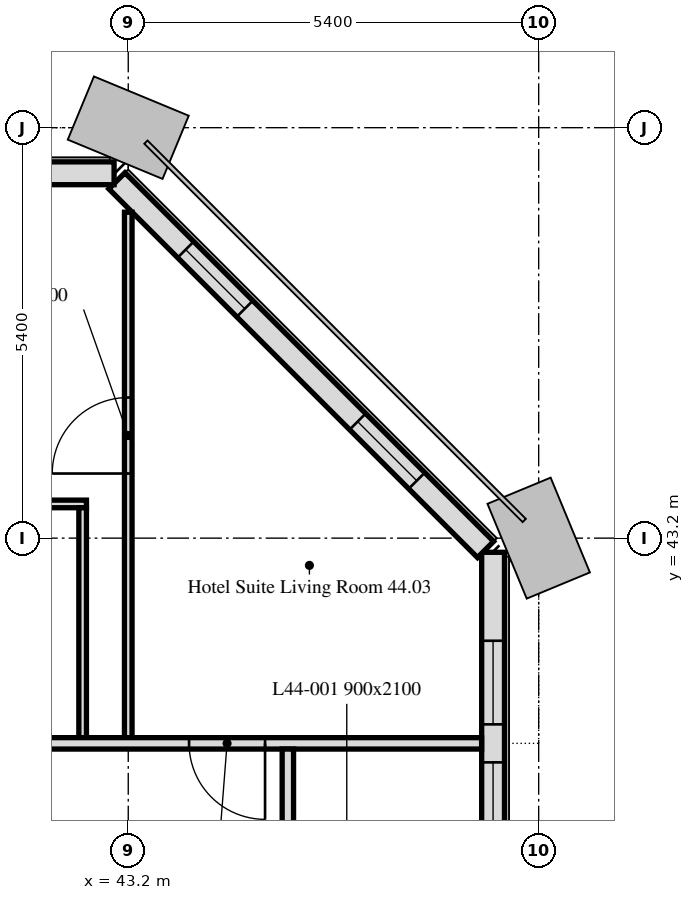
"""IFC4 building model, lengths in metres.
Left out: names, types, materials, properties, quantities, classifications, styles, units other than length and angle.
Written with IfcOpenShell. Run it as: python <this file> out.ifc"""

import sys

from ifc_helpers import new_model, si_unit, direction, frame, frame_2d, origin, place, context, subcontext, project, spatial, rectangle, extrude, element, fill, save


model = new_model("IFC4")
c1 = context("Model", 3, precision=1e-05, world=origin(), true_north=direction((0.0, 1.0)))
c2 = subcontext(c1, "Body", "Model", "MODEL_VIEW")
j1 = project(units=[si_unit("LENGTHUNIT", "METRE"), si_unit("PLANEANGLEUNIT", "RADIAN")], contexts=[c1])
p1 = place(None, origin())
s1 = spatial("IfcSite", under=j1, at=p1, CompositionType="ELEMENT")
p2 = place(p1, origin())
s2 = spatial("IfcBuilding", under=s1, at=p2, CompositionType="ELEMENT")
p3 = place(p2, frame((0.0, 0.0, 184.0)))
s3 = spatial("IfcBuildingStorey", under=s2, at=p3, CompositionType="ELEMENT", Elevation=184.0)
p4 = place(p3, frame((48.0, 10.986, 0.0), z_axis=(0.0, 0.0, 1.0), x_axis=(0.0, 1.0, 0.0)))
e1 = element("IfcWall", 1, at=p4, inside=s3, PredefinedType="SOLIDWALL", context=c2, shape_type="SweptSolid", body=[
    extrude(rectangle(XDim=32.027, YDim=0.3, at=frame_2d((16.014, 0.0))), origin(), (0.0, 0.0, 1.0), 3.0),
])
p5 = place(p4, frame((1.164, 0.0, 0.9)))
e2 = element("IfcOpeningElement", 2, at=p5, cuts=e1, PredefinedType="OPENING", context=c2, shape_type="SweptSolid", body=[
    extrude(rectangle(XDim=1.1, YDim=1.7, at=frame_2d((0.55, 0.85))), frame((0.0, 0.16, 0.0), z_axis=(0.0, -1.0, 0.0), x_axis=(1.0, 0.0, 0.0)), (0.0, 0.0, 1.0), 0.32),
])
p6 = place(p4, frame((2.764, 0.0, 0.9)))
e3 = element("IfcOpeningElement", 3, at=p6, cuts=e1, PredefinedType="OPENING", context=c2, shape_type="SweptSolid", body=[
    extrude(rectangle(XDim=1.1, YDim=1.7, at=frame_2d((0.55, 0.85))), frame((0.0, 0.16, 0.0), z_axis=(0.0, -1.0, 0.0), x_axis=(1.0, 0.0, 0.0)), (0.0, 0.0, 1.0), 0.32),
])
p7 = place(p4, frame((6.214, 0.0, 0.9)))
e4 = element("IfcOpeningElement", 4, at=p7, cuts=e1, PredefinedType="OPENING", context=c2, shape_type="SweptSolid", body=[
    extrude(rectangle(XDim=3.4, YDim=1.7, at=frame_2d((1.7, 0.85))), frame((0.0, 0.16, 0.0), z_axis=(0.0, -1.0, 0.0), x_axis=(1.0, 0.0, 0.0)), (0.0, 0.0, 1.0), 0.32),
])
p8 = place(p4, frame((11.964, 0.0, 0.9)))
e5 = element("IfcOpeningElement", 5, at=p8, cuts=e1, PredefinedType="OPENING", context=c2, shape_type="SweptSolid", body=[
    extrude(rectangle(XDim=1.1, YDim=1.7, at=frame_2d((0.55, 0.85))), frame((0.0, 0.16, 0.0), z_axis=(0.0, -1.0, 0.0), x_axis=(1.0, 0.0, 0.0)), (0.0, 0.0, 1.0), 0.32),
])
p9 = place(p4, frame((13.564, 0.0, 0.9)))
e6 = element("IfcOpeningElement", 6, at=p9, cuts=e1, PredefinedType="OPENING", context=c2, shape_type="SweptSolid", body=[
    extrude(rectangle(XDim=1.1, YDim=1.7, at=frame_2d((0.55, 0.85))), frame((0.0, 0.16, 0.0), z_axis=(0.0, -1.0, 0.0), x_axis=(1.0, 0.0, 0.0)), (0.0, 0.0, 1.0), 0.32),
])
p10 = place(p4, frame((17.014, 0.0, 0.9)))
e7 = element("IfcOpeningElement", 7, at=p10, cuts=e1, PredefinedType="OPENING", context=c2, shape_type="SweptSolid", body=[
    extrude(rectangle(XDim=3.4, YDim=1.7, at=frame_2d((1.7, 0.85))), frame((0.0, 0.16, 0.0), z_axis=(0.0, -1.0, 0.0), x_axis=(1.0, 0.0, 0.0)), (0.0, 0.0, 1.0), 0.32),
])
p11 = place(p4, frame((22.764, 0.0, 0.9)))
e8 = element("IfcOpeningElement", 8, at=p11, cuts=e1, PredefinedType="OPENING", context=c2, shape_type="SweptSolid", body=[
    extrude(rectangle(XDim=1.1, YDim=1.7, at=frame_2d((0.55, 0.85))), frame((0.0, 0.16, 0.0), z_axis=(0.0, -1.0, 0.0), x_axis=(1.0, 0.0, 0.0)), (0.0, 0.0, 1.0), 0.32),
])
p12 = place(p4, frame((24.364, 0.0, 0.9)))
e9 = element("IfcOpeningElement", 9, at=p12, cuts=e1, PredefinedType="OPENING", context=c2, shape_type="SweptSolid", body=[
    extrude(rectangle(XDim=1.1, YDim=1.7, at=frame_2d((0.55, 0.85))), frame((0.0, 0.16, 0.0), z_axis=(0.0, -1.0, 0.0), x_axis=(1.0, 0.0, 0.0)), (0.0, 0.0, 1.0), 0.32),
])
p13 = place(p4, frame((28.164, 0.0, 0.9)))
e10 = element("IfcOpeningElement", 10, at=p13, cuts=e1, PredefinedType="OPENING", context=c2, shape_type="SweptSolid", body=[
    extrude(rectangle(XDim=1.1, YDim=1.7, at=frame_2d((0.55, 0.85))), frame((0.0, 0.16, 0.0), z_axis=(0.0, -1.0, 0.0), x_axis=(1.0, 0.0, 0.0)), (0.0, 0.0, 1.0), 0.32),
])
p14 = place(p4, frame((29.764, 0.0, 0.9)))
e11 = element("IfcOpeningElement", 11, at=p14, cuts=e1, PredefinedType="OPENING", context=c2, shape_type="SweptSolid", body=[
    extrude(rectangle(XDim=1.1, YDim=1.7, at=frame_2d((0.55, 0.85))), frame((0.0, 0.16, 0.0), z_axis=(0.0, -1.0, 0.0), x_axis=(1.0, 0.0, 0.0)), (0.0, 0.0, 1.0), 0.32),
])
p15 = place(p3, frame((47.901, 43.051, 0.0), z_axis=(0.0, 0.0, 1.0), x_axis=(-0.707106781187, 0.707106781187, 0.0)))
e12 = element("IfcWall", 12, at=p15, inside=s3, PredefinedType="SOLIDWALL", context=c2, shape_type="SweptSolid", body=[
    extrude(rectangle(XDim=6.86, YDim=0.3, at=frame_2d((3.43, 0.0))), origin(), (0.0, 0.0, 1.0), 3.0),
])
p16 = place(p15, frame((1.28, 0.0, 0.9)))
e13 = element("IfcOpeningElement", 13, at=p16, cuts=e12, PredefinedType="OPENING", context=c2, shape_type="SweptSolid", body=[
    extrude(rectangle(XDim=1.1, YDim=1.7, at=frame_2d((0.55, 0.85))), frame((0.0, 0.16, 0.0), z_axis=(0.0, -1.0, 0.0), x_axis=(1.0, 0.0, 0.0)), (0.0, 0.0, 1.0), 0.32),
])
p17 = place(p15, frame((4.48, 0.0, 0.9)))
e14 = element("IfcOpeningElement", 14, at=p17, cuts=e12, PredefinedType="OPENING", context=c2, shape_type="SweptSolid", body=[
    extrude(rectangle(XDim=1.1, YDim=1.7, at=frame_2d((0.55, 0.85))), frame((0.0, 0.16, 0.0), z_axis=(0.0, -1.0, 0.0), x_axis=(1.0, 0.0, 0.0)), (0.0, 0.0, 1.0), 0.32),
])
p18 = place(p3, frame((43.014, 48.0, 0.0), z_axis=(0.0, 0.0, 1.0), x_axis=(-1.0, 0.0, 0.0)))
e15 = element("IfcWall", 15, at=p18, inside=s3, PredefinedType="SOLIDWALL", context=c2, shape_type="SweptSolid", body=[
    extrude(rectangle(XDim=32.027, YDim=0.3, at=frame_2d((16.014, 0.0))), origin(), (0.0, 0.0, 1.0), 3.0),
])
p19 = place(p18, frame((2.764, 0.0, 0.9)))
e16 = element("IfcOpeningElement", 16, at=p19, cuts=e15, PredefinedType="OPENING", context=c2, shape_type="SweptSolid", body=[
    extrude(rectangle(XDim=1.1, YDim=1.7, at=frame_2d((0.55, 0.85))), frame((0.0, 0.16, 0.0), z_axis=(0.0, -1.0, 0.0), x_axis=(1.0, 0.0, 0.0)), (0.0, 0.0, 1.0), 0.32),
])
p20 = place(p18, frame((6.214, 0.0, 0.9)))
e17 = element("IfcOpeningElement", 17, at=p20, cuts=e15, PredefinedType="OPENING", context=c2, shape_type="SweptSolid", body=[
    extrude(rectangle(XDim=3.4, YDim=1.7, at=frame_2d((1.7, 0.85))), frame((0.0, 0.16, 0.0), z_axis=(0.0, -1.0, 0.0), x_axis=(1.0, 0.0, 0.0)), (0.0, 0.0, 1.0), 0.32),
])
p21 = place(p18, frame((13.564, 0.0, 0.9)))
e18 = element("IfcOpeningElement", 18, at=p21, cuts=e15, PredefinedType="OPENING", context=c2, shape_type="SweptSolid", body=[
    extrude(rectangle(XDim=1.1, YDim=1.7, at=frame_2d((0.55, 0.85))), frame((0.0, 0.16, 0.0), z_axis=(0.0, -1.0, 0.0), x_axis=(1.0, 0.0, 0.0)), (0.0, 0.0, 1.0), 0.32),
])
p22 = place(p18, frame((17.014, 0.0, 0.9)))
e19 = element("IfcOpeningElement", 19, at=p22, cuts=e15, PredefinedType="OPENING", context=c2, shape_type="SweptSolid", body=[
    extrude(rectangle(XDim=3.4, YDim=1.7, at=frame_2d((1.7, 0.85))), frame((0.0, 0.16, 0.0), z_axis=(0.0, -1.0, 0.0), x_axis=(1.0, 0.0, 0.0)), (0.0, 0.0, 1.0), 0.32),
])
p23 = place(p18, frame((24.364, 0.0, 0.9)))
e20 = element("IfcOpeningElement", 20, at=p23, cuts=e15, PredefinedType="OPENING", context=c2, shape_type="SweptSolid", body=[
    extrude(rectangle(XDim=1.1, YDim=1.7, at=frame_2d((0.55, 0.85))), frame((0.0, 0.16, 0.0), z_axis=(0.0, -1.0, 0.0), x_axis=(1.0, 0.0, 0.0)), (0.0, 0.0, 1.0), 0.32),
])
p24 = place(p18, frame((27.814, 0.0, 0.9)))
e21 = element("IfcOpeningElement", 21, at=p24, cuts=e15, PredefinedType="OPENING", context=c2, shape_type="SweptSolid", body=[
    extrude(rectangle(XDim=3.4, YDim=1.7, at=frame_2d((1.7, 0.85))), frame((0.0, 0.16, 0.0), z_axis=(0.0, -1.0, 0.0), x_axis=(1.0, 0.0, 0.0)), (0.0, 0.0, 1.0), 0.32),
])
p25 = place(p3, frame((40.25, 43.65, 0.0), z_axis=(0.0, 0.0, 1.0), x_axis=(1.0, 0.0, 0.0)))
e22 = element("IfcWall", 22, at=p25, inside=s3, PredefinedType="PARTITIONING", context=c2, shape_type="SweptSolid", body=[
    extrude(rectangle(XDim=2.4, YDim=0.1, at=frame_2d((1.2, 0.0))), origin(), (0.0, 0.0, 1.0), 3.0),
])
p26 = place(p25, frame((0.9, 0.0, 0.0)))
e23 = element("IfcOpeningElement", 23, at=p26, cuts=e22, PredefinedType="OPENING", context=c2, shape_type="SweptSolid", body=[
    extrude(rectangle(XDim=0.9, YDim=2.1, at=frame_2d((0.45, 1.05))), frame((0.0, 0.05, 0.0), z_axis=(0.0, -1.0, 0.0), x_axis=(1.0, 0.0, 0.0)), (0.0, 0.0, 1.0), 0.1),
])
p27 = place(p3, frame((42.6, 43.6, 0.0), z_axis=(0.0, 0.0, 1.0), x_axis=(0.0, -1.0, 0.0)))
e24 = element("IfcWall", 24, at=p27, inside=s3, PredefinedType="PARTITIONING", context=c2, shape_type="SweptSolid", body=[
    extrude(rectangle(XDim=3.025, YDim=0.1, at=frame_2d((1.513, 0.0))), origin(), (0.0, 0.0, 1.0), 3.0),
])
p28 = place(p3, frame((43.2, 40.575, 0.0), z_axis=(0.0, 0.0, 1.0), x_axis=(0.0, 1.0, 0.0)))
e25 = element("IfcWall", 25, at=p28, inside=s3, PredefinedType="PARTITIONING", context=c2, shape_type="SweptSolid", body=[
    extrude(rectangle(XDim=6.913, YDim=0.1, at=frame_2d((3.457, 0.0))), origin(), (0.0, 0.0, 1.0), 3.0),
])
p29 = place(p28, frame((3.475, 0.0, 0.0)))
e26 = element("IfcOpeningElement", 26, at=p29, cuts=e25, PredefinedType="OPENING", context=c2, shape_type="SweptSolid", body=[
    extrude(rectangle(XDim=1.0, YDim=2.1, at=frame_2d((0.5, 1.05))), frame((0.0, 0.05, 0.0), z_axis=(0.0, -1.0, 0.0), x_axis=(1.0, 0.0, 0.0)), (0.0, 0.0, 1.0), 0.1),
])
p30 = place(p3, frame((47.849, 40.5, 0.0), z_axis=(0.0, 0.0, 1.0), x_axis=(-1.0, 0.0, 0.0)))
e27 = element("IfcWall", 27, at=p30, inside=s3, PredefinedType="PARTITIONING", context=c2, shape_type="SweptSolid", body=[
    extrude(rectangle(XDim=41.698, YDim=0.15, at=frame_2d((20.849, 0.0))), origin(), (0.0, 0.0, 1.0), 2.4),
])
p31 = place(p30, frame((37.899, 0.0, 0.0)))
e28 = element("IfcOpeningElement", 28, at=p31, cuts=e27, PredefinedType="OPENING", context=c2, shape_type="SweptSolid", body=[
    extrude(rectangle(XDim=1.0, YDim=2.1, at=frame_2d((0.5, 1.05))), frame((0.0, 0.075, 0.0), z_axis=(0.0, -1.0, 0.0), x_axis=(1.0, 0.0, 0.0)), (0.0, 0.0, 1.0), 0.15),
])
p32 = place(p30, frame((32.499, 0.0, 0.0)))
e29 = element("IfcOpeningElement", 29, at=p32, cuts=e27, PredefinedType="OPENING", context=c2, shape_type="SweptSolid", body=[
    extrude(rectangle(XDim=1.0, YDim=2.1, at=frame_2d((0.5, 1.05))), frame((0.0, 0.075, 0.0), z_axis=(0.0, -1.0, 0.0), x_axis=(1.0, 0.0, 0.0)), (0.0, 0.0, 1.0), 0.15),
])
p33 = place(p30, frame((27.099, 0.0, 0.0)))
e30 = element("IfcOpeningElement", 30, at=p33, cuts=e27, PredefinedType="OPENING", context=c2, shape_type="SweptSolid", body=[
    extrude(rectangle(XDim=1.0, YDim=2.1, at=frame_2d((0.5, 1.05))), frame((0.0, 0.075, 0.0), z_axis=(0.0, -1.0, 0.0), x_axis=(1.0, 0.0, 0.0)), (0.0, 0.0, 1.0), 0.15),
])
p34 = place(p30, frame((21.699, 0.0, 0.0)))
e31 = element("IfcOpeningElement", 31, at=p34, cuts=e27, PredefinedType="OPENING", context=c2, shape_type="SweptSolid", body=[
    extrude(rectangle(XDim=1.0, YDim=2.1, at=frame_2d((0.5, 1.05))), frame((0.0, 0.075, 0.0), z_axis=(0.0, -1.0, 0.0), x_axis=(1.0, 0.0, 0.0)), (0.0, 0.0, 1.0), 0.15),
])
p35 = place(p30, frame((16.299, 0.0, 0.0)))
e32 = element("IfcOpeningElement", 32, at=p35, cuts=e27, PredefinedType="OPENING", context=c2, shape_type="SweptSolid", body=[
    extrude(rectangle(XDim=1.0, YDim=2.1, at=frame_2d((0.5, 1.05))), frame((0.0, 0.075, 0.0), z_axis=(0.0, -1.0, 0.0), x_axis=(1.0, 0.0, 0.0)), (0.0, 0.0, 1.0), 0.15),
])
p36 = place(p30, frame((10.899, 0.0, 0.0)))
e33 = element("IfcOpeningElement", 33, at=p36, cuts=e27, PredefinedType="OPENING", context=c2, shape_type="SweptSolid", body=[
    extrude(rectangle(XDim=1.0, YDim=2.1, at=frame_2d((0.5, 1.05))), frame((0.0, 0.075, 0.0), z_axis=(0.0, -1.0, 0.0), x_axis=(1.0, 0.0, 0.0)), (0.0, 0.0, 1.0), 0.15),
])
p37 = place(p30, frame((2.849, 0.0, 0.0)))
e34 = element("IfcOpeningElement", 34, at=p37, cuts=e27, PredefinedType="OPENING", context=c2, shape_type="SweptSolid", body=[
    extrude(rectangle(XDim=1.0, YDim=2.1, at=frame_2d((0.5, 1.05))), frame((0.0, 0.075, 0.0), z_axis=(0.0, -1.0, 0.0), x_axis=(1.0, 0.0, 0.0)), (0.0, 0.0, 1.0), 0.15),
])
p38 = place(p3, frame((45.3, 40.425, 0.0), z_axis=(0.0, 0.0, 1.0), x_axis=(0.0, -1.0, 0.0)))
e35 = element("IfcWall", 35, at=p38, inside=s3, PredefinedType="PARTITIONING", context=c2, shape_type="SweptSolid", body=[
    extrude(rectangle(XDim=28.65, YDim=0.15, at=frame_2d((14.325, 0.0))), origin(), (0.0, 0.0, 1.0), 2.4),
])
p39 = place(p38, frame((10.225, 0.0, 0.0)))
e36 = element("IfcOpeningElement", 36, at=p39, cuts=e35, PredefinedType="OPENING", context=c2, shape_type="SweptSolid", body=[
    extrude(rectangle(XDim=1.0, YDim=2.1, at=frame_2d((0.5, 1.05))), frame((0.0, 0.075, 0.0), z_axis=(0.0, -1.0, 0.0), x_axis=(1.0, 0.0, 0.0)), (0.0, 0.0, 1.0), 0.15),
])
p40 = place(p38, frame((25.975, 0.0, 0.0)))
e37 = element("IfcOpeningElement", 37, at=p40, cuts=e35, PredefinedType="OPENING", context=c2, shape_type="SweptSolid", body=[
    extrude(rectangle(XDim=1.0, YDim=2.1, at=frame_2d((0.5, 1.05))), frame((0.0, 0.075, 0.0), z_axis=(0.0, -1.0, 0.0), x_axis=(1.0, 0.0, 0.0)), (0.0, 0.0, 1.0), 0.15),
])
p41 = place(p38, frame((4.825, 0.0, 0.0)))
e38 = element("IfcOpeningElement", 38, at=p41, cuts=e35, PredefinedType="OPENING", context=c2, shape_type="SweptSolid", body=[
    extrude(rectangle(XDim=1.0, YDim=2.1, at=frame_2d((0.5, 1.05))), frame((0.0, 0.075, 0.0), z_axis=(0.0, -1.0, 0.0), x_axis=(1.0, 0.0, 0.0)), (0.0, 0.0, 1.0), 0.15),
])
p42 = place(p38, frame((19.675, 0.0, 0.0)))
e39 = element("IfcOpeningElement", 39, at=p42, cuts=e35, PredefinedType="OPENING", context=c2, shape_type="SweptSolid", body=[
    extrude(rectangle(XDim=1.0, YDim=2.1, at=frame_2d((0.5, 1.05))), frame((0.0, 0.075, 0.0), z_axis=(0.0, -1.0, 0.0), x_axis=(1.0, 0.0, 0.0)), (0.0, 0.0, 1.0), 0.15),
])
p43 = place(p13, origin())
e40 = element("IfcWindow", 40, at=p43, inside=s3, PartitioningType="SINGLE_PANEL", PredefinedType="WINDOW", context=c2, shape_type="SweptSolid", body=[
    extrude(rectangle(XDim=1.1, YDim=1.7, at=frame_2d((0.55, 0.85))), frame((0.0, 0.03, 0.0), z_axis=(0.0, -1.0, 0.0), x_axis=(1.0, 0.0, 0.0)), (0.0, 0.0, 1.0), 0.06),
])
fill(e10, e40)
p44 = place(p14, origin())
e41 = element("IfcWindow", 41, at=p44, inside=s3, PartitioningType="SINGLE_PANEL", PredefinedType="WINDOW", context=c2, shape_type="SweptSolid", body=[
    extrude(rectangle(XDim=1.1, YDim=1.7, at=frame_2d((0.55, 0.85))), frame((0.0, 0.03, 0.0), z_axis=(0.0, -1.0, 0.0), x_axis=(1.0, 0.0, 0.0)), (0.0, 0.0, 1.0), 0.06),
])
fill(e11, e41)
p45 = place(p16, origin())
e42 = element("IfcWindow", 42, at=p45, inside=s3, PartitioningType="SINGLE_PANEL", PredefinedType="WINDOW", context=c2, shape_type="SweptSolid", body=[
    extrude(rectangle(XDim=1.1, YDim=1.7, at=frame_2d((0.55, 0.85))), frame((0.0, 0.03, 0.0), z_axis=(0.0, -1.0, 0.0), x_axis=(1.0, 0.0, 0.0)), (0.0, 0.0, 1.0), 0.06),
])
fill(e13, e42)
p46 = place(p17, origin())
e43 = element("IfcWindow", 43, at=p46, inside=s3, PartitioningType="SINGLE_PANEL", PredefinedType="WINDOW", context=c2, shape_type="SweptSolid", body=[
    extrude(rectangle(XDim=1.1, YDim=1.7, at=frame_2d((0.55, 0.85))), frame((0.0, 0.03, 0.0), z_axis=(0.0, -1.0, 0.0), x_axis=(1.0, 0.0, 0.0)), (0.0, 0.0, 1.0), 0.06),
])
fill(e14, e43)
p47 = place(p29, origin())
e44 = element("IfcDoor", 44, at=p47, inside=s3, OperationType="SINGLE_SWING_RIGHT", PredefinedType="DOOR", context=c2, shape_type="SweptSolid", body=[
    extrude(rectangle(XDim=1.0, YDim=2.1, at=frame_2d((0.5, 1.05))), frame((0.0, 0.025, 0.0), z_axis=(0.0, -1.0, 0.0), x_axis=(1.0, 0.0, 0.0)), (0.0, 0.0, 1.0), 0.05),
])
fill(e26, e44)
p48 = place(p37, origin())
e45 = element("IfcDoor", 45, at=p48, inside=s3, OperationType="SINGLE_SWING_LEFT", PredefinedType="DOOR", context=c2, shape_type="SweptSolid", body=[
    extrude(rectangle(XDim=1.0, YDim=2.1, at=frame_2d((0.5, 1.05))), frame((0.0, 0.025, 0.0), z_axis=(0.0, -1.0, 0.0), x_axis=(1.0, 0.0, 0.0)), (0.0, 0.0, 1.0), 0.05),
])
fill(e34, e45)
save(model, sys.argv[1])
